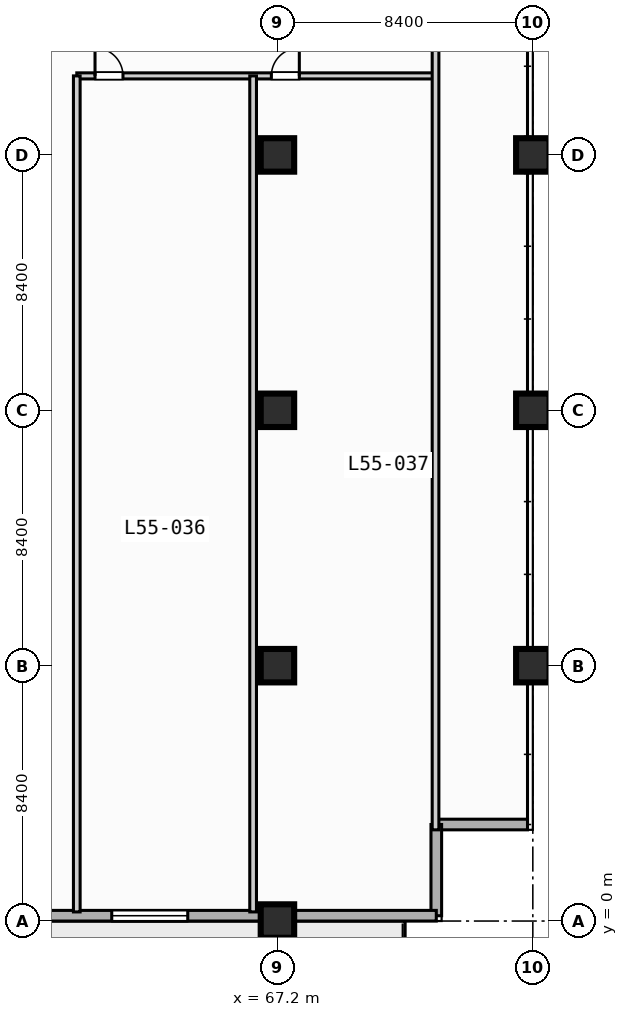
"""IFC4 building model, lengths in metres.
Left out: names, types, materials, properties, quantities, classifications, styles, units other than length and angle.
Written with IfcOpenShell. Run it as: python <this file> out.ifc"""

import sys

from ifc_helpers import new_model, si_unit, direction, frame, frame_2d, origin, origin_2d, place, context, subcontext, project, spatial, rectangle, extrude, element, fill, save


model = new_model("IFC4")
c1 = context("Model", 3, precision=1e-05, world=origin(), true_north=direction((0.0, 1.0)))
c2 = subcontext(c1, "Body", "Model", "MODEL_VIEW")
j1 = project(units=[si_unit("LENGTHUNIT", "METRE"), si_unit("PLANEANGLEUNIT", "RADIAN")], contexts=[c1])
p1 = place(None, origin())
s1 = spatial("IfcSite", under=j1, at=p1, CompositionType="ELEMENT")
p2 = place(p1, origin())
s2 = spatial("IfcBuilding", under=s1, at=p2, CompositionType="ELEMENT")
p3 = place(p2, frame((0.0, 0.0, 224.0)))
s3 = spatial("IfcBuildingStorey", under=s2, at=p3, CompositionType="ELEMENT", Elevation=224.0)
for number, where, z_axis, x_axis in (
    (1, (67.2, 0.0, 0.0), (0.0, 0.0, 1.0), (1.0, 0.0, 0.0)),
    (2, (67.2, 8.4, 0.0), (0.0, 0.0, 1.0), (1.0, 0.0, 0.0)),
    (3, (67.2, 16.8, 0.0), (0.0, 0.0, 1.0), (1.0, 0.0, 0.0)),
    (4, (67.2, 25.2, 0.0), (0.0, 0.0, 1.0), (1.0, 0.0, 0.0)),
    (5, (75.6, 8.4, 0.0), (0.0, 0.0, 1.0), (1.0, 0.0, 0.0)),
    (6, (75.6, 16.8, 0.0), (0.0, 0.0, 1.0), (1.0, 0.0, 0.0)),
    (7, (75.6, 25.2, 0.0), (0.0, 0.0, 1.0), (1.0, 0.0, 0.0)),
):
    element("IfcColumn", number, at=place(p3, frame(where, z_axis=z_axis, x_axis=x_axis)), inside=s3, PredefinedType="COLUMN", context=c2, shape_type="SweptSolid", body=[
        extrude(rectangle(XDim=1.1, YDim=1.1, at=origin_2d()), origin(), (0.0, 0.0, 1.0), 4.2),
    ])
for number, where, z_axis, x_axis in (
    (8, (75.425, 3.175, 0.0), (0.0, 0.0, 1.0), (-1.0, 0.0, 0.0)),
    (9, (72.425, 3.175, 0.0), (0.0, 0.0, 1.0), (0.0, -1.0, 0.0)),
):
    element("IfcWall", number, at=place(p3, frame(where, z_axis=z_axis, x_axis=x_axis)), inside=s3, PredefinedType="STANDARD", context=c2, shape_type="SweptSolid", body=[
        extrude(rectangle(XDim=3.0, YDim=0.35, at=frame_2d((1.5, 0.0))), origin(), (0.0, 0.0, 1.0), 3.75),
    ])
p4 = place(p3, frame((72.425, 0.175, 0.0), z_axis=(0.0, 0.0, 1.0), x_axis=(-1.0, 0.0, 0.0)))
e10 = element("IfcWall", 10, at=p4, inside=s3, PredefinedType="STANDARD", context=c2, shape_type="SweptSolid", body=[
    extrude(rectangle(XDim=69.25, YDim=0.35, at=frame_2d((34.625, 0.0))), origin(), (0.0, 0.0, 1.0), 3.75),
])
p5 = place(p4, frame((50.725, 0.0, 0.0)))
e11 = element("IfcOpeningElement", 11, at=p5, cuts=e10, PredefinedType="OPENING", context=c2, shape_type="SweptSolid", body=[
    extrude(rectangle(XDim=1.4, YDim=2.2, at=frame_2d((0.7, 1.1))), frame((0.0, 0.185, 0.0), z_axis=(0.0, -1.0, 0.0), x_axis=(1.0, 0.0, 0.0)), (0.0, 0.0, 1.0), 0.37),
])
p6 = place(p4, frame((24.975, 0.0, 0.85)))
e12 = element("IfcOpeningElement", 12, at=p6, cuts=e10, PredefinedType="OPENING", context=c2, shape_type="SweptSolid", body=[
    extrude(rectangle(XDim=2.5, YDim=2.2, at=frame_2d((1.25, 1.1))), frame((0.0, 0.185, 0.0), z_axis=(0.0, -1.0, 0.0), x_axis=(1.0, 0.0, 0.0)), (0.0, 0.0, 1.0), 0.37),
])
p7 = place(p4, frame((8.175, 0.0, 0.85)))
e13 = element("IfcOpeningElement", 13, at=p7, cuts=e10, PredefinedType="OPENING", context=c2, shape_type="SweptSolid", body=[
    extrude(rectangle(XDim=2.5, YDim=2.2, at=frame_2d((1.25, 1.1))), frame((0.0, 0.185, 0.0), z_axis=(0.0, -1.0, 0.0), x_axis=(1.0, 0.0, 0.0)), (0.0, 0.0, 1.0), 0.37),
])
p8 = place(p3, frame((60.6, 27.8, 0.0), z_axis=(0.0, 0.0, 1.0), x_axis=(1.0, 0.0, 0.0)))
e14 = element("IfcWall", 14, at=p8, inside=s3, PredefinedType="PARTITIONING", context=c2, shape_type="SweptSolid", body=[
    extrude(rectangle(XDim=11.8, YDim=0.2, at=frame_2d((5.9, 0.0))), origin(), (0.0, 0.0, 1.0), 3.75),
])
p9 = place(p8, frame((0.6, 0.0, 0.0)))
e15 = element("IfcOpeningElement", 15, at=p9, cuts=e14, PredefinedType="OPENING", context=c2, shape_type="SweptSolid", body=[
    extrude(rectangle(XDim=0.92, YDim=2.1, at=frame_2d((0.46, 1.05))), frame((0.0, 0.11, 0.0), z_axis=(0.0, -1.0, 0.0), x_axis=(1.0, 0.0, 0.0)), (0.0, 0.0, 1.0), 0.22),
])
p10 = place(p8, frame((6.4, 0.0, 0.0)))
e16 = element("IfcOpeningElement", 16, at=p10, cuts=e14, PredefinedType="OPENING", context=c2, shape_type="SweptSolid", body=[
    extrude(rectangle(XDim=0.92, YDim=2.1, at=frame_2d((0.46, 1.05))), frame((0.0, 0.11, 0.0), z_axis=(0.0, -1.0, 0.0), x_axis=(1.0, 0.0, 0.0)), (0.0, 0.0, 1.0), 0.22),
])
p11 = place(p3, frame((60.6, 0.3, 0.0), z_axis=(0.0, 0.0, 1.0), x_axis=(0.0, 1.0, 0.0)))
e17 = element("IfcWall", 17, at=p11, inside=s3, PredefinedType="PARTITIONING", context=c2, shape_type="SweptSolid", body=[
    extrude(rectangle(XDim=27.5, YDim=0.22, at=frame_2d((13.75, 0.0))), origin(), (0.0, 0.0, 1.0), 3.75),
])
p12 = place(p3, frame((72.4, 3.0, 0.0), z_axis=(0.0, 0.0, 1.0), x_axis=(0.0, 1.0, 0.0)))
e18 = element("IfcWall", 18, at=p12, inside=s3, PredefinedType="PARTITIONING", context=c2, shape_type="SweptSolid", body=[
    extrude(rectangle(XDim=27.4, YDim=0.22, at=frame_2d((13.7, 0.0))), origin(), (0.0, 0.0, 1.0), 3.75),
])
p13 = place(p3, frame((66.4, 0.3, 0.0), z_axis=(0.0, 0.0, 1.0), x_axis=(0.0, 1.0, 0.0)))
e19 = element("IfcWall", 19, at=p13, inside=s3, PredefinedType="PARTITIONING", context=c2, shape_type="SweptSolid", body=[
    extrude(rectangle(XDim=27.5, YDim=0.22, at=frame_2d((13.75, 0.0))), origin(), (0.0, 0.0, 1.0), 3.75),
])
p14 = place(p7, origin())
e20 = element("IfcWindow", 20, at=p14, inside=s3, PartitioningType="SINGLE_PANEL", PredefinedType="WINDOW", context=c2, shape_type="SweptSolid", body=[
    extrude(rectangle(XDim=2.5, YDim=2.2, at=frame_2d((1.25, 1.1))), frame((0.0, 0.03, 0.0), z_axis=(0.0, -1.0, 0.0), x_axis=(1.0, 0.0, 0.0)), (0.0, 0.0, 1.0), 0.06),
])
fill(e13, e20)
p15 = place(p9, origin())
e21 = element("IfcDoor", 21, at=p15, inside=s3, OperationType="SINGLE_SWING_LEFT", PredefinedType="DOOR", context=c2, shape_type="SweptSolid", body=[
    extrude(rectangle(XDim=0.92, YDim=2.1, at=frame_2d((0.46, 1.05))), frame((0.0, 0.025, 0.0), z_axis=(0.0, -1.0, 0.0), x_axis=(1.0, 0.0, 0.0)), (0.0, 0.0, 1.0), 0.05),
])
fill(e15, e21)
p16 = place(p10, origin())
e22 = element("IfcDoor", 22, at=p16, inside=s3, OperationType="SINGLE_SWING_RIGHT", PredefinedType="DOOR", context=c2, shape_type="SweptSolid", body=[
    extrude(rectangle(XDim=0.92, YDim=2.1, at=frame_2d((0.46, 1.05))), frame((0.0, 0.025, 0.0), z_axis=(0.0, -1.0, 0.0), x_axis=(1.0, 0.0, 0.0)), (0.0, 0.0, 1.0), 0.05),
])
fill(e16, e22)
save(model, sys.argv[1])
